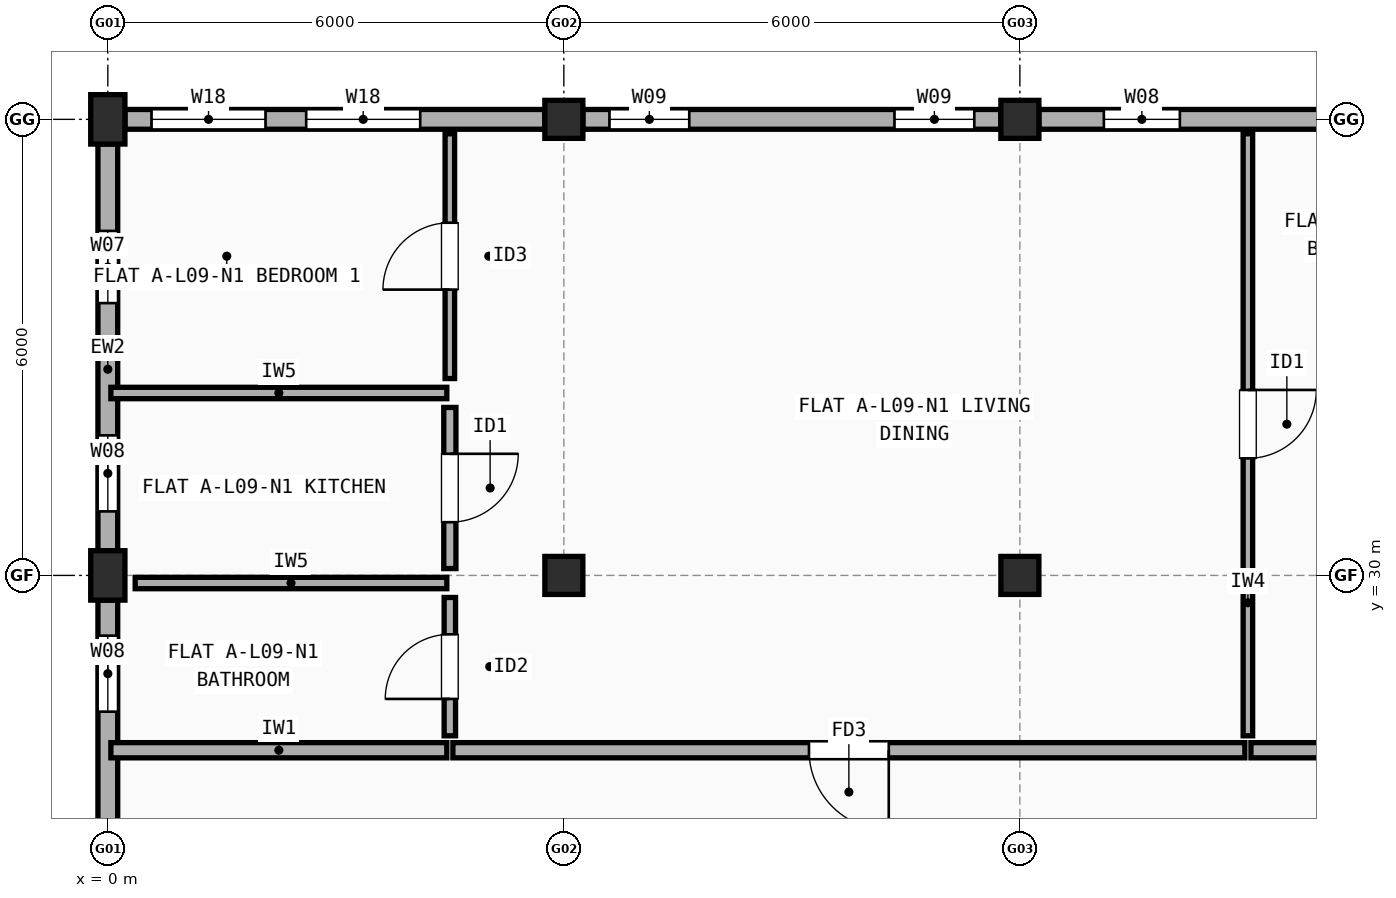
"""IFC4 building model, lengths in metres.
Left out: names, types, materials, properties, quantities, classifications, styles, units other than length and angle.
Written with IfcOpenShell. Run it as: python <this file> out.ifc"""

import sys

from ifc_helpers import new_model, si_unit, direction, frame, frame_2d, origin, origin_2d, place, context, subcontext, project, spatial, rectangle, extrude, element, fill, save


model = new_model("IFC4")
c1 = context("Model", 3, precision=1e-05, world=origin(), true_north=direction((0.0, 1.0)))
c2 = subcontext(c1, "Body", "Model", "MODEL_VIEW")
j1 = project(units=[si_unit("LENGTHUNIT", "METRE"), si_unit("PLANEANGLEUNIT", "RADIAN")], contexts=[c1])
p1 = place(None, origin())
s1 = spatial("IfcSite", under=j1, at=p1, CompositionType="ELEMENT")
p2 = place(p1, origin())
s2 = spatial("IfcBuilding", under=s1, at=p2, CompositionType="ELEMENT")
p3 = place(p2, frame((0.0, 0.0, 30.1)))
s3 = spatial("IfcBuildingStorey", under=s2, at=p3, CompositionType="ELEMENT", Elevation=30.1)
for number, where, z_axis, x_axis in (
    (1, (0.0, 30.0, 0.0), (0.0, 0.0, 1.0), (1.0, 0.0, 0.0)),
    (2, (0.0, 36.0, 0.0), (0.0, 0.0, 1.0), (1.0, 0.0, 0.0)),
):
    element("IfcColumn", number, at=place(p3, frame(where, z_axis=z_axis, x_axis=x_axis)), inside=s3, PredefinedType="COLUMN", context=c2, shape_type="SweptSolid", body=[
        extrude(rectangle(XDim=0.45, YDim=0.65, at=origin_2d()), origin(), (0.0, 0.0, 1.0), 2.985),
    ])
for number, where, z_axis, x_axis in (
    (3, (6.0, 30.0, 0.0), (0.0, 0.0, 1.0), (1.0, 0.0, 0.0)),
    (4, (6.0, 36.0, 0.0), (0.0, 0.0, 1.0), (1.0, 0.0, 0.0)),
    (5, (12.0, 30.0, 0.0), (0.0, 0.0, 1.0), (1.0, 0.0, 0.0)),
    (6, (12.0, 36.0, 0.0), (0.0, 0.0, 1.0), (1.0, 0.0, 0.0)),
):
    element("IfcColumn", number, at=place(p3, frame(where, z_axis=z_axis, x_axis=x_axis)), inside=s3, PredefinedType="COLUMN", context=c2, shape_type="SweptSolid", body=[
        extrude(rectangle(XDim=0.5, YDim=0.5, at=origin_2d()), origin(), (0.0, 0.0, 1.0), 2.985),
    ])
p4 = place(p3, frame((17.75, 36.0, 0.0), z_axis=(0.0, 0.0, 1.0), x_axis=(-1.0, 0.0, 0.0)))
e7 = element("IfcWall", 7, at=p4, inside=s3, PredefinedType="STANDARD", context=c2, shape_type="SweptSolid", body=[
    extrude(rectangle(XDim=5.5, YDim=0.26, at=frame_2d((2.75, 0.0))), origin(), (0.0, 0.0, 1.0), 2.467),
])
p5 = place(p4, frame((0.88, 0.0, 0.9)))
e8 = element("IfcOpeningElement", 8, at=p5, cuts=e7, PredefinedType="OPENING", context=c2, shape_type="SweptSolid", body=[
    extrude(rectangle(XDim=0.95, YDim=1.35, at=frame_2d((0.475, 0.675))), frame((0.0, 0.14, 0.0), z_axis=(0.0, -1.0, 0.0), x_axis=(1.0, 0.0, 0.0)), (0.0, 0.0, 1.0), 0.28),
])
p6 = place(p4, frame((3.645, 0.0, 0.9)))
e9 = element("IfcOpeningElement", 9, at=p6, cuts=e7, PredefinedType="OPENING", context=c2, shape_type="SweptSolid", body=[
    extrude(rectangle(XDim=1.0, YDim=1.4, at=frame_2d((0.5, 0.7))), frame((0.0, 0.14, 0.0), z_axis=(0.0, -1.0, 0.0), x_axis=(1.0, 0.0, 0.0)), (0.0, 0.0, 1.0), 0.28),
])
p7 = place(p3, frame((11.75, 36.0, 0.0), z_axis=(0.0, 0.0, 1.0), x_axis=(-1.0, 0.0, 0.0)))
e10 = element("IfcWall", 10, at=p7, inside=s3, PredefinedType="STANDARD", context=c2, shape_type="SweptSolid", body=[
    extrude(rectangle(XDim=5.5, YDim=0.26, at=frame_2d((2.75, 0.0))), origin(), (0.0, 0.0, 1.0), 2.467),
])
p8 = place(p7, frame((0.35, 0.0, 0.9)))
e11 = element("IfcOpeningElement", 11, at=p8, cuts=e10, PredefinedType="OPENING", context=c2, shape_type="SweptSolid", body=[
    extrude(rectangle(XDim=1.05, YDim=1.35, at=frame_2d((0.525, 0.675))), frame((0.0, 0.14, 0.0), z_axis=(0.0, -1.0, 0.0), x_axis=(1.0, 0.0, 0.0)), (0.0, 0.0, 1.0), 0.28),
])
p9 = place(p7, frame((4.1, 0.0, 0.9)))
e12 = element("IfcOpeningElement", 12, at=p9, cuts=e10, PredefinedType="OPENING", context=c2, shape_type="SweptSolid", body=[
    extrude(rectangle(XDim=1.05, YDim=1.35, at=frame_2d((0.525, 0.675))), frame((0.0, 0.14, 0.0), z_axis=(0.0, -1.0, 0.0), x_axis=(1.0, 0.0, 0.0)), (0.0, 0.0, 1.0), 0.28),
])
p10 = place(p3, frame((5.75, 36.0, 0.0), z_axis=(0.0, 0.0, 1.0), x_axis=(-1.0, 0.0, 0.0)))
e13 = element("IfcWall", 13, at=p10, inside=s3, PredefinedType="STANDARD", context=c2, shape_type="SweptSolid", body=[
    extrude(rectangle(XDim=5.525, YDim=0.26, at=frame_2d((2.762, 0.0))), origin(), (0.0, 0.0, 1.0), 2.467),
])
p11 = place(p10, frame((1.64, 0.0, 0.9)))
e14 = element("IfcOpeningElement", 14, at=p11, cuts=e13, PredefinedType="OPENING", context=c2, shape_type="SweptSolid", body=[
    extrude(rectangle(XDim=1.5, YDim=1.4, at=frame_2d((0.75, 0.7))), frame((0.0, 0.14, 0.0), z_axis=(0.0, -1.0, 0.0), x_axis=(1.0, 0.0, 0.0)), (0.0, 0.0, 1.0), 0.28),
])
p12 = place(p10, frame((3.675, 0.0, 0.9)))
e15 = element("IfcOpeningElement", 15, at=p12, cuts=e13, PredefinedType="OPENING", context=c2, shape_type="SweptSolid", body=[
    extrude(rectangle(XDim=1.5, YDim=1.4, at=frame_2d((0.75, 0.7))), frame((0.0, 0.14, 0.0), z_axis=(0.0, -1.0, 0.0), x_axis=(1.0, 0.0, 0.0)), (0.0, 0.0, 1.0), 0.28),
])
p13 = place(p3, frame((0.0, 35.675, 0.0), z_axis=(0.0, 0.0, 1.0), x_axis=(0.0, -1.0, 0.0)))
e16 = element("IfcWall", 16, at=p13, inside=s3, PredefinedType="STANDARD", context=c2, shape_type="SweptSolid", body=[
    extrude(rectangle(XDim=5.35, YDim=0.26, at=frame_2d((2.675, 0.0))), origin(), (0.0, 0.0, 1.0), 2.467),
])
p14 = place(p13, frame((1.143, 0.0, 0.9)))
e17 = element("IfcOpeningElement", 17, at=p14, cuts=e16, PredefinedType="OPENING", context=c2, shape_type="SweptSolid", body=[
    extrude(rectangle(XDim=0.95, YDim=1.35, at=frame_2d((0.475, 0.675))), frame((0.0, 0.14, 0.0), z_axis=(0.0, -1.0, 0.0), x_axis=(1.0, 0.0, 0.0)), (0.0, 0.0, 1.0), 0.28),
])
p15 = place(p13, frame((3.833, 0.0, 0.9)))
e18 = element("IfcOpeningElement", 18, at=p15, cuts=e16, PredefinedType="OPENING", context=c2, shape_type="SweptSolid", body=[
    extrude(rectangle(XDim=1.0, YDim=1.4, at=frame_2d((0.5, 0.7))), frame((0.0, 0.14, 0.0), z_axis=(0.0, -1.0, 0.0), x_axis=(1.0, 0.0, 0.0)), (0.0, 0.0, 1.0), 0.28),
])
p16 = place(p3, frame((0.0, 29.675, 0.0), z_axis=(0.0, 0.0, 1.0), x_axis=(0.0, -1.0, 0.0)))
e19 = element("IfcWall", 19, at=p16, inside=s3, PredefinedType="STANDARD", context=c2, shape_type="SweptSolid", body=[
    extrude(rectangle(XDim=5.35, YDim=0.26, at=frame_2d((2.675, 0.0))), origin(), (0.0, 0.0, 1.0), 2.467),
])
p17 = place(p16, frame((0.468, 0.0, 0.9)))
e20 = element("IfcOpeningElement", 20, at=p17, cuts=e19, PredefinedType="OPENING", context=c2, shape_type="SweptSolid", body=[
    extrude(rectangle(XDim=1.0, YDim=1.4, at=frame_2d((0.5, 0.7))), frame((0.0, 0.14, 0.0), z_axis=(0.0, -1.0, 0.0), x_axis=(1.0, 0.0, 0.0)), (0.0, 0.0, 1.0), 0.28),
])
p18 = place(p16, frame((3.083, 0.0, 0.9)))
e21 = element("IfcOpeningElement", 21, at=p18, cuts=e19, PredefinedType="OPENING", context=c2, shape_type="SweptSolid", body=[
    extrude(rectangle(XDim=1.2, YDim=1.35, at=frame_2d((0.6, 0.675))), frame((0.0, 0.14, 0.0), z_axis=(0.0, -1.0, 0.0), x_axis=(1.0, 0.0, 0.0)), (0.0, 0.0, 1.0), 0.28),
])
p19 = place(p3, frame((0.04, 27.7, 0.0), z_axis=(0.0, 0.0, 1.0), x_axis=(1.0, 0.0, 0.0)))
e22 = element("IfcWall", 22, at=p19, inside=s3, PredefinedType="SOLIDWALL", context=c2, shape_type="SweptSolid", body=[
    extrude(rectangle(XDim=4.42, YDim=0.2, at=frame_2d((2.21, 0.0))), origin(), (0.0, 0.0, 1.0), 2.467),
])
p20 = place(p3, frame((4.54, 27.7, 0.0), z_axis=(0.0, 0.0, 1.0), x_axis=(1.0, 0.0, 0.0)))
e23 = element("IfcWall", 23, at=p20, inside=s3, PredefinedType="SOLIDWALL", context=c2, shape_type="SweptSolid", body=[
    extrude(rectangle(XDim=10.42, YDim=0.2, at=frame_2d((5.21, 0.0))), origin(), (0.0, 0.0, 1.0), 2.508),
])
p21 = place(p20, frame((4.685, 0.0, 0.0)))
e24 = element("IfcOpeningElement", 24, at=p21, cuts=e23, PredefinedType="OPENING", context=c2, shape_type="SweptSolid", body=[
    extrude(rectangle(XDim=1.05, YDim=2.15, at=frame_2d((0.525, 1.075))), frame((0.0, 0.11, 0.0), z_axis=(0.0, -1.0, 0.0), x_axis=(1.0, 0.0, 0.0)), (0.0, 0.0, 1.0), 0.22),
])
p22 = place(p3, frame((4.5, 32.59, 0.0), z_axis=(0.0, 0.0, 1.0), x_axis=(0.0, 1.0, 0.0)))
e25 = element("IfcWall", 25, at=p22, inside=s3, PredefinedType="PARTITIONING", context=c2, shape_type="SweptSolid", body=[
    extrude(rectangle(XDim=3.22, YDim=0.125, at=frame_2d((1.61, 0.0))), origin(), (0.0, 0.0, 1.0), 2.985),
])
p23 = place(p22, frame((1.17, 0.0, 0.0)))
e26 = element("IfcOpeningElement", 26, at=p23, cuts=e25, PredefinedType="OPENING", context=c2, shape_type="SweptSolid", body=[
    extrude(rectangle(XDim=0.88, YDim=2.1, at=frame_2d((0.44, 1.05))), frame((0.0, 0.073, 0.0), z_axis=(0.0, -1.0, 0.0), x_axis=(1.0, 0.0, 0.0)), (0.0, 0.0, 1.0), 0.145),
])
p24 = place(p3, frame((4.5, 30.09, 0.0), z_axis=(0.0, 0.0, 1.0), x_axis=(0.0, 1.0, 0.0)))
e27 = element("IfcWall", 27, at=p24, inside=s3, PredefinedType="PLUMBINGWALL", context=c2, shape_type="SweptSolid", body=[
    extrude(rectangle(XDim=2.12, YDim=0.16, at=frame_2d((1.06, 0.0))), origin(), (0.0, 0.0, 1.0), 2.467),
])
p25 = place(p24, frame((0.61, 0.0, 0.0)))
e28 = element("IfcOpeningElement", 28, at=p25, cuts=e27, PredefinedType="OPENING", context=c2, shape_type="SweptSolid", body=[
    extrude(rectangle(XDim=0.9, YDim=2.1, at=frame_2d((0.45, 1.05))), frame((0.0, 0.09, 0.0), z_axis=(0.0, -1.0, 0.0), x_axis=(1.0, 0.0, 0.0)), (0.0, 0.0, 1.0), 0.18),
])
p26 = place(p3, frame((4.5, 27.89, 0.0), z_axis=(0.0, 0.0, 1.0), x_axis=(0.0, 1.0, 0.0)))
e29 = element("IfcWall", 29, at=p26, inside=s3, PredefinedType="PARTITIONING", context=c2, shape_type="SweptSolid", body=[
    extrude(rectangle(XDim=1.82, YDim=0.15, at=frame_2d((0.91, 0.0))), origin(), (0.0, 0.0, 1.0), 2.985),
])
p27 = place(p26, frame((0.485, 0.0, 0.0)))
e30 = element("IfcOpeningElement", 30, at=p27, cuts=e29, PredefinedType="OPENING", context=c2, shape_type="SweptSolid", body=[
    extrude(rectangle(XDim=0.85, YDim=2.1, at=frame_2d((0.425, 1.05))), frame((0.0, 0.085, 0.0), z_axis=(0.0, -1.0, 0.0), x_axis=(1.0, 0.0, 0.0)), (0.0, 0.0, 1.0), 0.17),
])
p28 = place(p3, frame((0.04, 32.4, 0.0), z_axis=(0.0, 0.0, 1.0), x_axis=(1.0, 0.0, 0.0)))
e31 = element("IfcWall", 31, at=p28, inside=s3, PredefinedType="PARTITIONING", context=c2, shape_type="SweptSolid", body=[
    extrude(rectangle(XDim=4.42, YDim=0.15, at=frame_2d((2.21, 0.0))), origin(), (0.0, 0.0, 1.0), 2.467),
])
p29 = place(p3, frame((0.36, 29.9, 0.0), z_axis=(0.0, 0.0, 1.0), x_axis=(1.0, 0.0, 0.0)))
e32 = element("IfcWall", 32, at=p29, inside=s3, PredefinedType="PARTITIONING", context=c2, shape_type="SweptSolid", body=[
    extrude(rectangle(XDim=4.1, YDim=0.15, at=frame_2d((2.05, 0.0))), origin(), (0.0, 0.0, 1.0), 2.467),
])
p30 = place(p3, frame((15.04, 27.7, 0.0), z_axis=(0.0, 0.0, 1.0), x_axis=(1.0, 0.0, 0.0)))
e33 = element("IfcWall", 33, at=p30, inside=s3, PredefinedType="SOLIDWALL", context=c2, shape_type="SweptSolid", body=[
    extrude(rectangle(XDim=2.92, YDim=0.2, at=frame_2d((1.46, 0.0))), origin(), (0.0, 0.0, 1.0), 2.985),
])
p31 = place(p3, frame((15.0, 27.89, 0.0), z_axis=(0.0, 0.0, 1.0), x_axis=(0.0, 1.0, 0.0)))
e34 = element("IfcWall", 34, at=p31, inside=s3, PredefinedType="PARTITIONING", context=c2, shape_type="SweptSolid", body=[
    extrude(rectangle(XDim=7.92, YDim=0.125, at=frame_2d((3.96, 0.0))), origin(), (0.0, 0.0, 1.0), 2.467),
])
p32 = place(p31, frame((3.65, 0.0, 0.0)))
e35 = element("IfcOpeningElement", 35, at=p32, cuts=e34, PredefinedType="OPENING", context=c2, shape_type="SweptSolid", body=[
    extrude(rectangle(XDim=0.9, YDim=2.1, at=frame_2d((0.45, 1.05))), frame((0.0, 0.073, 0.0), z_axis=(0.0, -1.0, 0.0), x_axis=(1.0, 0.0, 0.0)), (0.0, 0.0, 1.0), 0.145),
])
p33 = place(p6, origin())
e36 = element("IfcWindow", 36, at=p33, inside=s3, PartitioningType="SINGLE_PANEL", PredefinedType="WINDOW", context=c2, shape_type="SweptSolid", body=[
    extrude(rectangle(XDim=1.0, YDim=1.4, at=frame_2d((0.5, 0.7))), frame((0.0, 0.03, 0.0), z_axis=(0.0, -1.0, 0.0), x_axis=(1.0, 0.0, 0.0)), (0.0, 0.0, 1.0), 0.06),
])
fill(e9, e36)
p34 = place(p8, origin())
e37 = element("IfcWindow", 37, at=p34, inside=s3, PartitioningType="SINGLE_PANEL", PredefinedType="WINDOW", context=c2, shape_type="SweptSolid", body=[
    extrude(rectangle(XDim=1.05, YDim=1.35, at=frame_2d((0.525, 0.675))), frame((0.0, 0.03, 0.0), z_axis=(0.0, -1.0, 0.0), x_axis=(1.0, 0.0, 0.0)), (0.0, 0.0, 1.0), 0.06),
])
fill(e11, e37)
p35 = place(p9, origin())
e38 = element("IfcWindow", 38, at=p35, inside=s3, PartitioningType="SINGLE_PANEL", PredefinedType="WINDOW", context=c2, shape_type="SweptSolid", body=[
    extrude(rectangle(XDim=1.05, YDim=1.35, at=frame_2d((0.525, 0.675))), frame((0.0, 0.03, 0.0), z_axis=(0.0, -1.0, 0.0), x_axis=(1.0, 0.0, 0.0)), (0.0, 0.0, 1.0), 0.06),
])
fill(e12, e38)
p36 = place(p11, origin())
e39 = element("IfcWindow", 39, at=p36, inside=s3, PartitioningType="SINGLE_PANEL", PredefinedType="WINDOW", context=c2, shape_type="SweptSolid", body=[
    extrude(rectangle(XDim=1.5, YDim=1.4, at=frame_2d((0.75, 0.7))), frame((0.0, 0.03, 0.0), z_axis=(0.0, -1.0, 0.0), x_axis=(1.0, 0.0, 0.0)), (0.0, 0.0, 1.0), 0.06),
])
fill(e14, e39)
p37 = place(p12, origin())
e40 = element("IfcWindow", 40, at=p37, inside=s3, PartitioningType="SINGLE_PANEL", PredefinedType="WINDOW", context=c2, shape_type="SweptSolid", body=[
    extrude(rectangle(XDim=1.5, YDim=1.4, at=frame_2d((0.75, 0.7))), frame((0.0, 0.03, 0.0), z_axis=(0.0, -1.0, 0.0), x_axis=(1.0, 0.0, 0.0)), (0.0, 0.0, 1.0), 0.06),
])
fill(e15, e40)
p38 = place(p14, origin())
e41 = element("IfcWindow", 41, at=p38, inside=s3, PartitioningType="SINGLE_PANEL", PredefinedType="WINDOW", context=c2, shape_type="SweptSolid", body=[
    extrude(rectangle(XDim=0.95, YDim=1.35, at=frame_2d((0.475, 0.675))), frame((0.0, 0.03, 0.0), z_axis=(0.0, -1.0, 0.0), x_axis=(1.0, 0.0, 0.0)), (0.0, 0.0, 1.0), 0.06),
])
fill(e17, e41)
p39 = place(p15, origin())
e42 = element("IfcWindow", 42, at=p39, inside=s3, PartitioningType="SINGLE_PANEL", PredefinedType="WINDOW", context=c2, shape_type="SweptSolid", body=[
    extrude(rectangle(XDim=1.0, YDim=1.4, at=frame_2d((0.5, 0.7))), frame((0.0, 0.03, 0.0), z_axis=(0.0, -1.0, 0.0), x_axis=(1.0, 0.0, 0.0)), (0.0, 0.0, 1.0), 0.06),
])
fill(e18, e42)
p40 = place(p17, origin())
e43 = element("IfcWindow", 43, at=p40, inside=s3, PartitioningType="SINGLE_PANEL", PredefinedType="WINDOW", context=c2, shape_type="SweptSolid", body=[
    extrude(rectangle(XDim=1.0, YDim=1.4, at=frame_2d((0.5, 0.7))), frame((0.0, 0.03, 0.0), z_axis=(0.0, -1.0, 0.0), x_axis=(1.0, 0.0, 0.0)), (0.0, 0.0, 1.0), 0.06),
])
fill(e20, e43)
p41 = place(p21, origin())
e44 = element("IfcDoor", 44, at=p41, inside=s3, OperationType="SINGLE_SWING_RIGHT", PredefinedType="DOOR", context=c2, shape_type="SweptSolid", body=[
    extrude(rectangle(XDim=1.05, YDim=2.15, at=frame_2d((0.525, 1.075))), frame((0.0, 0.025, 0.0), z_axis=(0.0, -1.0, 0.0), x_axis=(1.0, 0.0, 0.0)), (0.0, 0.0, 1.0), 0.05),
])
fill(e24, e44)
p42 = place(p23, origin())
e45 = element("IfcDoor", 45, at=p42, inside=s3, OperationType="SINGLE_SWING_LEFT", PredefinedType="DOOR", context=c2, shape_type="SweptSolid", body=[
    extrude(rectangle(XDim=0.88, YDim=2.1, at=frame_2d((0.44, 1.05))), frame((0.0, 0.025, 0.0), z_axis=(0.0, -1.0, 0.0), x_axis=(1.0, 0.0, 0.0)), (0.0, 0.0, 1.0), 0.05),
])
fill(e26, e45)
p43 = place(p25, origin())
e46 = element("IfcDoor", 46, at=p43, inside=s3, OperationType="SINGLE_SWING_RIGHT", PredefinedType="DOOR", context=c2, shape_type="SweptSolid", body=[
    extrude(rectangle(XDim=0.9, YDim=2.1, at=frame_2d((0.45, 1.05))), frame((0.0, 0.025, 0.0), z_axis=(0.0, -1.0, 0.0), x_axis=(1.0, 0.0, 0.0)), (0.0, 0.0, 1.0), 0.05),
])
fill(e28, e46)
p44 = place(p27, origin())
e47 = element("IfcDoor", 47, at=p44, inside=s3, OperationType="SINGLE_SWING_LEFT", PredefinedType="DOOR", context=c2, shape_type="SweptSolid", body=[
    extrude(rectangle(XDim=0.85, YDim=2.1, at=frame_2d((0.425, 1.05))), frame((0.0, 0.025, 0.0), z_axis=(0.0, -1.0, 0.0), x_axis=(1.0, 0.0, 0.0)), (0.0, 0.0, 1.0), 0.05),
])
fill(e30, e47)
p45 = place(p32, origin())
e48 = element("IfcDoor", 48, at=p45, inside=s3, OperationType="SINGLE_SWING_RIGHT", PredefinedType="DOOR", context=c2, shape_type="SweptSolid", body=[
    extrude(rectangle(XDim=0.9, YDim=2.1, at=frame_2d((0.45, 1.05))), frame((0.0, 0.025, 0.0), z_axis=(0.0, -1.0, 0.0), x_axis=(1.0, 0.0, 0.0)), (0.0, 0.0, 1.0), 0.05),
])
fill(e35, e48)
save(model, sys.argv[1])
